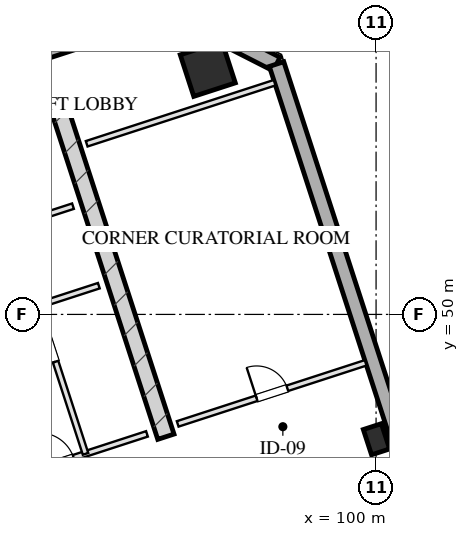
"""IFC4 building model, lengths in metres.
Left out: names, types, materials, properties, quantities, classifications, styles, units other than length and angle.
Written with IfcOpenShell. Run it as: python <this file> out.ifc"""

import sys

from ifc_helpers import new_model, si_unit, direction, frame, frame_2d, origin, origin_2d, place, context, subcontext, project, spatial, rectangle, hollow_rectangle, extrude, element, fill, save


model = new_model("IFC4")
c1 = context("Model", 3, precision=1e-05, world=origin(), true_north=direction((0.0, 1.0)))
c2 = subcontext(c1, "Body", "Model", "MODEL_VIEW")
j1 = project(units=[si_unit("LENGTHUNIT", "METRE"), si_unit("PLANEANGLEUNIT", "RADIAN")], contexts=[c1])
p1 = place(None, origin())
s1 = spatial("IfcSite", under=j1, at=p1, CompositionType="ELEMENT")
p2 = place(p1, origin())
s2 = spatial("IfcBuilding", under=s1, at=p2, CompositionType="ELEMENT")
p3 = place(p2, frame((0.0, 0.0, 244.0)))
s3 = spatial("IfcBuildingStorey", under=s2, at=p3, CompositionType="ELEMENT", Elevation=244.0)
p4 = place(p3, frame((76.415, 50.489, 0.0), z_axis=(0.0, 0.0, 1.0), x_axis=(0.951056810414, 0.309016089169, 0.0)))
e1 = element("IfcWall", 1, at=p4, inside=s3, PredefinedType="SHEAR", context=c2, shape_type="SweptSolid", body=[
    extrude(rectangle(XDim=16.25, YDim=0.45, at=frame_2d((8.125, 0.0))), origin(), (0.0, 0.0, 1.0), 3.2),
])
p5 = place(p3, frame((94.469, 46.781, 0.0), z_axis=(0.0, 0.0, 1.0), x_axis=(-0.309004419953, 0.951060601881, 0.0)))
e2 = element("IfcWall", 2, at=p5, inside=s3, PredefinedType="SHEAR", context=c2, shape_type="SweptSolid", body=[
    extrude(rectangle(XDim=9.33, YDim=0.45, at=frame_2d((4.665, 0.0))), origin(), (0.0, 0.0, 1.0), 3.2),
])
p6 = place(p3, frame((95.572, 56.461, 0.0), z_axis=(0.0, 0.0, 1.0), x_axis=(0.951056516295, 0.309016994375, 0.0)))
e3 = element("IfcColumn", 3, at=p6, inside=s3, PredefinedType="COLUMN", context=c2, shape_type="SweptSolid", body=[
    extrude(hollow_rectangle(XDim=1.15, YDim=1.15, WallThickness=0.04, at=origin_2d()), origin(), (0.0, 0.0, 1.0), 3.201),
])
p7 = place(p3, frame((100.01, 46.716, 0.0), z_axis=(0.0, 0.0, 1.0), x_axis=(0.951056516295, 0.309016994375, 0.0)))
e4 = element("IfcColumn", 4, at=p7, inside=s3, PredefinedType="COLUMN", context=c2, shape_type="SweptSolid", body=[
    extrude(hollow_rectangle(XDim=0.5, YDim=0.7, WallThickness=0.025, at=origin_2d()), origin(), (0.0, 0.0, 1.0), 3.201),
])
p8 = place(p3, frame((72.165, 50.706, 0.0), z_axis=(0.0, 0.0, 1.0), x_axis=(0.951058012937, 0.309012388148, 0.0)))
e5 = element("IfcWall", 5, at=p8, inside=s3, PredefinedType="SOLIDWALL", context=c2, shape_type="SweptSolid", body=[
    extrude(rectangle(XDim=23.6, YDim=0.4, at=frame_2d((11.8, 0.0))), origin(), (0.0, 0.0, 1.0), 2.36),
])
p9 = place(p3, frame((94.61, 57.999, 0.0), z_axis=(0.0, 0.0, 1.0), x_axis=(0.890979603174, -0.454043331334, 0.0)))
e6 = element("IfcWall", 6, at=p9, inside=s3, PredefinedType="SOLIDWALL", context=c2, shape_type="SweptSolid", body=[
    extrude(rectangle(XDim=3.111, YDim=0.4, at=frame_2d((1.556, 0.0))), origin(), (0.0, 0.0, 1.0), 2.36),
])
p10 = place(p3, frame((97.382, 56.586, 0.0), z_axis=(0.0, 0.0, 1.0), x_axis=(0.309016491071, -0.951056679828, 0.0)))
e7 = element("IfcWall", 7, at=p10, inside=s3, PredefinedType="SOLIDWALL", context=c2, shape_type="SweptSolid", body=[
    extrude(rectangle(XDim=38.4, YDim=0.4, at=frame_2d((19.2, 0.0))), origin(), (0.0, 0.0, 1.0), 2.36),
])
p11 = place(p10, frame((24.625, 0.0, 0.75)))
e8 = element("IfcOpeningElement", 8, at=p11, cuts=e7, PredefinedType="OPENING", context=c2, shape_type="SweptSolid", body=[
    extrude(rectangle(XDim=1.95, YDim=1.21, at=frame_2d((0.975, 0.605))), frame((0.0, 0.21, 0.0), z_axis=(0.0, -1.0, 0.0), x_axis=(1.0, 0.0, 0.0)), (0.0, 0.0, 1.0), 0.42),
])
p12 = place(p10, frame((20.825, 0.0, 0.75)))
e9 = element("IfcOpeningElement", 9, at=p12, cuts=e7, PredefinedType="OPENING", context=c2, shape_type="SweptSolid", body=[
    extrude(rectangle(XDim=1.95, YDim=1.21, at=frame_2d((0.975, 0.605))), frame((0.0, 0.21, 0.0), z_axis=(0.0, -1.0, 0.0), x_axis=(1.0, 0.0, 0.0)), (0.0, 0.0, 1.0), 0.42),
])
p13 = place(p10, frame((15.625, 0.0, 0.75)))
e10 = element("IfcOpeningElement", 10, at=p13, cuts=e7, PredefinedType="OPENING", context=c2, shape_type="SweptSolid", body=[
    extrude(rectangle(XDim=1.95, YDim=1.21, at=frame_2d((0.975, 0.605))), frame((0.0, 0.21, 0.0), z_axis=(0.0, -1.0, 0.0), x_axis=(1.0, 0.0, 0.0)), (0.0, 0.0, 1.0), 0.42),
])
p14 = place(p10, frame((11.825, 0.0, 0.75)))
e11 = element("IfcOpeningElement", 11, at=p14, cuts=e7, PredefinedType="OPENING", context=c2, shape_type="SweptSolid", body=[
    extrude(rectangle(XDim=1.95, YDim=1.21, at=frame_2d((0.975, 0.605))), frame((0.0, 0.21, 0.0), z_axis=(0.0, -1.0, 0.0), x_axis=(1.0, 0.0, 0.0)), (0.0, 0.0, 1.0), 0.42),
])
p15 = place(p3, frame((90.928, 45.868, 0.0), z_axis=(0.0, 0.0, 1.0), x_axis=(0.951059297078, 0.309008435874, 0.0)))
e12 = element("IfcWall", 12, at=p15, inside=s3, PredefinedType="PARTITIONING", context=c2, shape_type="SweptSolid", body=[
    extrude(rectangle(XDim=3.2, YDim=0.15, at=frame_2d((1.6, 0.0))), origin(), (0.0, 0.0, 1.0), 2.925),
])
p16 = place(p15, frame((0.22, 0.0, 0.0)))
e13 = element("IfcOpeningElement", 13, at=p16, cuts=e12, PredefinedType="OPENING", context=c2, shape_type="SweptSolid", body=[
    extrude(rectangle(XDim=0.95, YDim=2.05, at=frame_2d((0.475, 1.025))), frame((0.0, 0.085, 0.0), z_axis=(0.0, -1.0, 0.0), x_axis=(1.0, 0.0, 0.0)), (0.0, 0.0, 1.0), 0.17),
])
p17 = place(p3, frame((92.355, 46.331, 0.0), z_axis=(0.0, 0.0, 1.0), x_axis=(-0.309007490203, 0.951059604335, 0.0)))
e14 = element("IfcWall", 14, at=p17, inside=s3, PredefinedType="PARTITIONING", context=c2, shape_type="SweptSolid", body=[
    extrude(rectangle(XDim=8.43, YDim=0.15, at=frame_2d((4.215, 0.0))), origin(), (0.0, 0.0, 1.0), 2.925),
])
p18 = place(p17, frame((2.55, 0.0, 0.0)))
e15 = element("IfcOpeningElement", 15, at=p18, cuts=e14, PredefinedType="OPENING", context=c2, shape_type="SweptSolid", body=[
    extrude(rectangle(XDim=0.95, YDim=2.05, at=frame_2d((0.475, 1.025))), frame((0.0, 0.085, 0.0), z_axis=(0.0, -1.0, 0.0), x_axis=(1.0, 0.0, 0.0)), (0.0, 0.0, 1.0), 0.17),
])
p19 = place(p17, frame((4.7, 0.0, 0.0)))
e16 = element("IfcOpeningElement", 16, at=p19, cuts=e14, PredefinedType="OPENING", context=c2, shape_type="SweptSolid", body=[
    extrude(rectangle(XDim=0.9, YDim=2.05, at=frame_2d((0.45, 1.025))), frame((0.0, 0.085, 0.0), z_axis=(0.0, -1.0, 0.0), x_axis=(1.0, 0.0, 0.0)), (0.0, 0.0, 1.0), 0.17),
])
p20 = place(p17, frame((6.8, 0.0, 0.0)))
e17 = element("IfcOpeningElement", 17, at=p20, cuts=e14, PredefinedType="OPENING", context=c2, shape_type="SweptSolid", body=[
    extrude(rectangle(XDim=0.9, YDim=2.05, at=frame_2d((0.45, 1.025))), frame((0.0, 0.085, 0.0), z_axis=(0.0, -1.0, 0.0), x_axis=(1.0, 0.0, 0.0)), (0.0, 0.0, 1.0), 0.17),
])
p21 = place(p3, frame((91.088, 50.23, 0.0), z_axis=(0.0, 0.0, 1.0), x_axis=(0.951054116971, 0.309024378638, 0.0)))
e18 = element("IfcWall", 18, at=p21, inside=s3, PredefinedType="PARTITIONING", context=c2, shape_type="SweptSolid", body=[
    extrude(rectangle(XDim=1.7, YDim=0.15, at=frame_2d((0.85, 0.0))), origin(), (0.0, 0.0, 1.0), 2.925),
])
p22 = place(p3, frame((90.408, 52.323, 0.0), z_axis=(0.0, 0.0, 1.0), x_axis=(0.951040401051, 0.309066587596, 0.0)))
e19 = element("IfcWall", 19, at=p22, inside=s3, PredefinedType="PARTITIONING", context=c2, shape_type="SweptSolid", body=[
    extrude(rectangle(XDim=1.7, YDim=0.15, at=frame_2d((0.85, 0.0))), origin(), (0.0, 0.0, 1.0), 2.925),
])
p23 = place(p3, frame((92.385, 54.49, 0.0), z_axis=(0.0, 0.0, 1.0), x_axis=(0.951055112834, 0.309021313752, 0.0)))
e20 = element("IfcWall", 20, at=p23, inside=s3, PredefinedType="PARTITIONING", context=c2, shape_type="SweptSolid", body=[
    extrude(rectangle(XDim=5.2, YDim=0.15, at=frame_2d((2.6, 0.0))), origin(), (0.0, 0.0, 1.0), 2.925),
])
p24 = place(p3, frame((94.78, 47.119, 0.0), z_axis=(0.0, 0.0, 1.0), x_axis=(0.951055112834, 0.309021313752, 0.0)))
e21 = element("IfcWall", 21, at=p24, inside=s3, PredefinedType="PARTITIONING", context=c2, shape_type="SweptSolid", body=[
    extrude(rectangle(XDim=5.2, YDim=0.15, at=frame_2d((2.6, 0.0))), origin(), (0.0, 0.0, 1.0), 2.925),
])
p25 = place(p24, frame((2.184, 0.0, 0.0)))
e22 = element("IfcOpeningElement", 22, at=p25, cuts=e21, PredefinedType="OPENING", context=c2, shape_type="SweptSolid", body=[
    extrude(rectangle(XDim=0.85, YDim=2.05, at=frame_2d((0.425, 1.025))), frame((0.0, 0.085, 0.0), z_axis=(0.0, -1.0, 0.0), x_axis=(1.0, 0.0, 0.0)), (0.0, 0.0, 1.0), 0.17),
])
p26 = place(p16, origin())
e23 = element("IfcDoor", 23, at=p26, inside=s3, OperationType="SINGLE_SWING_LEFT", PredefinedType="DOOR", context=c2, shape_type="SweptSolid", body=[
    extrude(rectangle(XDim=0.95, YDim=2.05, at=frame_2d((0.475, 1.025))), frame((0.0, 0.025, 0.0), z_axis=(0.0, -1.0, 0.0), x_axis=(1.0, 0.0, 0.0)), (0.0, 0.0, 1.0), 0.05),
])
fill(e13, e23)
p27 = place(p18, origin())
e24 = element("IfcDoor", 24, at=p27, inside=s3, OperationType="SINGLE_SWING_LEFT", PredefinedType="DOOR", context=c2, shape_type="SweptSolid", body=[
    extrude(rectangle(XDim=0.95, YDim=2.05, at=frame_2d((0.475, 1.025))), frame((0.0, 0.025, 0.0), z_axis=(0.0, -1.0, 0.0), x_axis=(1.0, 0.0, 0.0)), (0.0, 0.0, 1.0), 0.05),
])
fill(e15, e24)
p28 = place(p25, origin())
e25 = element("IfcDoor", 25, at=p28, inside=s3, OperationType="SINGLE_SWING_LEFT", PredefinedType="DOOR", context=c2, shape_type="SweptSolid", body=[
    extrude(rectangle(XDim=0.85, YDim=2.05, at=frame_2d((0.425, 1.025))), frame((0.0, 0.025, 0.0), z_axis=(0.0, -1.0, 0.0), x_axis=(1.0, 0.0, 0.0)), (0.0, 0.0, 1.0), 0.05),
])
fill(e22, e25)
save(model, sys.argv[1])
